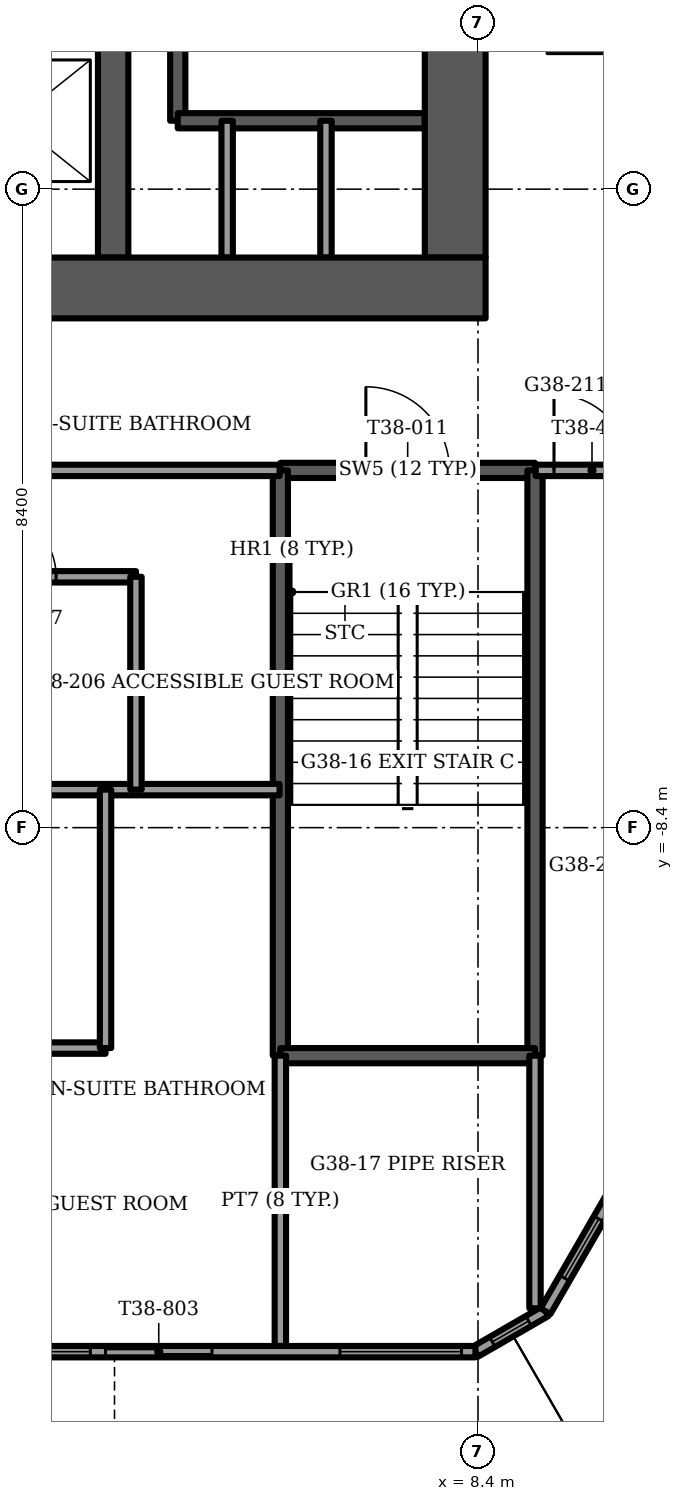
"""IFC4 building model, lengths in metres.
Left out: names, types, materials, properties, quantities, classifications, styles, units other than length and angle.
Written with IfcOpenShell. Run it as: python <this file> out.ifc"""

import sys

from ifc_helpers import new_model, si_unit, direction, frame, frame_2d, origin, place, context, subcontext, project, spatial, rectangle, extrude, element, fill, save


model = new_model("IFC4")
c1 = context("Model", 3, precision=1e-05, world=origin(), true_north=direction((0.0, 1.0)))
c2 = subcontext(c1, "Body", "Model", "MODEL_VIEW")
j1 = project(units=[si_unit("LENGTHUNIT", "METRE"), si_unit("PLANEANGLEUNIT", "RADIAN")], contexts=[c1])
p1 = place(None, origin())
s1 = spatial("IfcSite", under=j1, at=p1, CompositionType="ELEMENT")
p2 = place(p1, origin())
s2 = spatial("IfcBuilding", under=s1, at=p2, CompositionType="ELEMENT")
p3 = place(p2, frame((0.0, 0.0, 157.0)))
s3 = spatial("IfcBuildingStorey", under=s2, at=p3, CompositionType="ELEMENT", Elevation=157.0)
p4 = place(p3, frame((-8.5, -1.3, -0.3), z_axis=(0.0, 0.0, 1.0), x_axis=(1.0, 0.0, 0.0)))
e1 = element("IfcWall", 1, at=p4, inside=s3, PredefinedType="SHEAR", context=c2, shape_type="SweptSolid", body=[
    extrude(rectangle(XDim=17.0, YDim=0.8, at=frame_2d((8.5, 0.0))), origin(), (0.0, 0.0, 1.0), 3.75),
])
p5 = place(p4, frame((7.7, 0.0, 0.0)))
e2 = element("IfcOpeningElement", 2, at=p5, cuts=e1, PredefinedType="OPENING", context=c2, shape_type="SweptSolid", body=[
    extrude(rectangle(XDim=1.6, YDim=2.1, at=frame_2d((0.8, 1.05))), frame((0.0, 0.4, 0.0), z_axis=(0.0, -1.0, 0.0), x_axis=(1.0, 0.0, 0.0)), (0.0, 0.0, 1.0), 0.8),
])
p6 = place(p3, frame((8.1, -0.9, -0.3), z_axis=(0.0, 0.0, 1.0), x_axis=(0.0, 1.0, 0.0)))
e3 = element("IfcWall", 3, at=p6, inside=s3, PredefinedType="SHEAR", context=c2, shape_type="SweptSolid", body=[
    extrude(rectangle(XDim=9.8, YDim=0.8, at=frame_2d((4.9, 0.0))), origin(), (0.0, 0.0, 1.0), 3.75),
])
p7 = place(p6, frame((8.15, 0.0, 0.0)))
e4 = element("IfcOpeningElement", 4, at=p7, cuts=e3, PredefinedType="OPENING", context=c2, shape_type="SweptSolid", body=[
    extrude(rectangle(XDim=1.1, YDim=2.1, at=frame_2d((0.55, 1.05))), frame((0.0, 0.4, 0.0), z_axis=(0.0, -1.0, 0.0), x_axis=(1.0, 0.0, 0.0)), (0.0, 0.0, 1.0), 0.8),
])
p8 = place(p3, frame((3.6, -0.9, -0.3), z_axis=(0.0, 0.0, 1.0), x_axis=(0.0, 1.0, 0.0)))
e5 = element("IfcWall", 5, at=p8, inside=s3, PredefinedType="SHEAR", context=c2, shape_type="SweptSolid", body=[
    extrude(rectangle(XDim=9.8, YDim=0.4, at=frame_2d((4.9, 0.0))), origin(), (0.0, 0.0, 1.0), 3.75),
])
p9 = place(p3, frame((-8.366, -15.294, 0.0), z_axis=(0.0, 0.0, 1.0), x_axis=(1.0, 0.0, 0.0)))
e6 = element("IfcWall", 6, at=p9, inside=s3, PredefinedType="SOLIDWALL", context=c2, shape_type="SweptSolid", body=[
    extrude(rectangle(XDim=16.732, YDim=0.15, at=frame_2d((8.366, 0.0))), origin(), (0.0, 0.0, 1.0), 3.45),
])
p10 = place(p9, frame((2.916, 0.0, 0.15)))
e7 = element("IfcOpeningElement", 7, at=p10, cuts=e6, PredefinedType="OPENING", context=c2, shape_type="SweptSolid", body=[
    extrude(rectangle(XDim=1.6, YDim=2.85, at=frame_2d((0.8, 1.425))), frame((0.0, 0.075, 0.0), z_axis=(0.0, -1.0, 0.0), x_axis=(1.0, 0.0, 0.0)), (0.0, 0.0, 1.0), 0.15),
])
p11 = place(p9, frame((4.566, 0.0, 0.0)))
e8 = element("IfcOpeningElement", 8, at=p11, cuts=e6, PredefinedType="OPENING", context=c2, shape_type="SweptSolid", body=[
    extrude(rectangle(XDim=1.4, YDim=2.4, at=frame_2d((0.7, 1.2))), frame((0.0, 0.075, 0.0), z_axis=(0.0, -1.0, 0.0), x_axis=(1.0, 0.0, 0.0)), (0.0, 0.0, 1.0), 0.15),
])
p12 = place(p9, frame((7.816, 0.0, 0.15)))
e9 = element("IfcOpeningElement", 9, at=p12, cuts=e6, PredefinedType="OPENING", context=c2, shape_type="SweptSolid", body=[
    extrude(rectangle(XDim=0.9, YDim=2.85, at=frame_2d((0.45, 1.425))), frame((0.0, 0.075, 0.0), z_axis=(0.0, -1.0, 0.0), x_axis=(1.0, 0.0, 0.0)), (0.0, 0.0, 1.0), 0.15),
])
p13 = place(p9, frame((10.766, 0.0, 0.15)))
e10 = element("IfcOpeningElement", 10, at=p13, cuts=e6, PredefinedType="OPENING", context=c2, shape_type="SweptSolid", body=[
    extrude(rectangle(XDim=0.9, YDim=2.85, at=frame_2d((0.45, 1.425))), frame((0.0, 0.075, 0.0), z_axis=(0.0, -1.0, 0.0), x_axis=(1.0, 0.0, 0.0)), (0.0, 0.0, 1.0), 0.15),
])
p14 = place(p9, frame((11.866, 0.0, 0.0)))
e11 = element("IfcOpeningElement", 11, at=p14, cuts=e6, PredefinedType="OPENING", context=c2, shape_type="SweptSolid", body=[
    extrude(rectangle(XDim=1.4, YDim=2.4, at=frame_2d((0.7, 1.2))), frame((0.0, 0.075, 0.0), z_axis=(0.0, -1.0, 0.0), x_axis=(1.0, 0.0, 0.0)), (0.0, 0.0, 1.0), 0.15),
])
p15 = place(p9, frame((0.183, 0.0, 0.15)))
e12 = element("IfcOpeningElement", 12, at=p15, cuts=e6, PredefinedType="OPENING", context=c2, shape_type="SweptSolid", body=[
    extrude(rectangle(XDim=1.6, YDim=2.73, at=frame_2d((0.8, 1.365))), frame((0.0, 0.075, 0.0), z_axis=(0.0, -1.0, 0.0), x_axis=(1.0, 0.0, 0.0)), (0.0, 0.0, 1.0), 0.15),
])
p16 = place(p9, frame((14.949, 0.0, 0.15)))
e13 = element("IfcOpeningElement", 13, at=p16, cuts=e6, PredefinedType="OPENING", context=c2, shape_type="SweptSolid", body=[
    extrude(rectangle(XDim=1.6, YDim=2.73, at=frame_2d((0.8, 1.365))), frame((0.0, 0.075, 0.0), z_axis=(0.0, -1.0, 0.0), x_axis=(1.0, 0.0, 0.0)), (0.0, 0.0, 1.0), 0.15),
])
p17 = place(p3, frame((9.289, -14.762, 0.0), z_axis=(0.0, 0.0, 1.0), x_axis=(0.499985985267, 0.866033495043, 0.0)))
e14 = element("IfcWall", 14, at=p17, inside=s3, PredefinedType="SOLIDWALL", context=c2, shape_type="SweptSolid", body=[
    extrude(rectangle(XDim=16.279, YDim=0.15, at=frame_2d((8.14, 0.0))), origin(), (0.0, 0.0, 1.0), 3.45),
])
p18 = place(p17, frame((2.14, 0.0, 0.15)))
e15 = element("IfcOpeningElement", 15, at=p18, cuts=e14, PredefinedType="OPENING", context=c2, shape_type="SweptSolid", body=[
    extrude(rectangle(XDim=1.6, YDim=2.85, at=frame_2d((0.8, 1.425))), frame((0.0, 0.075, 0.0), z_axis=(0.0, -1.0, 0.0), x_axis=(1.0, 0.0, 0.0)), (0.0, 0.0, 1.0), 0.15),
])
p19 = place(p17, frame((4.34, 0.0, 0.0)))
e16 = element("IfcOpeningElement", 16, at=p19, cuts=e14, PredefinedType="OPENING", context=c2, shape_type="SweptSolid", body=[
    extrude(rectangle(XDim=1.4, YDim=2.4, at=frame_2d((0.7, 1.2))), frame((0.0, 0.075, 0.0), z_axis=(0.0, -1.0, 0.0), x_axis=(1.0, 0.0, 0.0)), (0.0, 0.0, 1.0), 0.15),
])
p20 = place(p17, frame((6.34, 0.0, 0.15)))
e17 = element("IfcOpeningElement", 17, at=p20, cuts=e14, PredefinedType="OPENING", context=c2, shape_type="SweptSolid", body=[
    extrude(rectangle(XDim=0.9, YDim=2.85, at=frame_2d((0.45, 1.425))), frame((0.0, 0.075, 0.0), z_axis=(0.0, -1.0, 0.0), x_axis=(1.0, 0.0, 0.0)), (0.0, 0.0, 1.0), 0.15),
])
p21 = place(p17, frame((7.497, 0.0, 0.0)))
e18 = element("IfcOpeningElement", 18, at=p21, cuts=e14, PredefinedType="OPENING", context=c2, shape_type="SweptSolid", body=[
    extrude(rectangle(XDim=1.4, YDim=2.4, at=frame_2d((0.7, 1.2))), frame((0.0, 0.075, 0.0), z_axis=(0.0, -1.0, 0.0), x_axis=(1.0, 0.0, 0.0)), (0.0, 0.0, 1.0), 0.15),
])
p22 = place(p17, frame((10.54, 0.0, 0.15)))
e19 = element("IfcOpeningElement", 19, at=p22, cuts=e14, PredefinedType="OPENING", context=c2, shape_type="SweptSolid", body=[
    extrude(rectangle(XDim=1.6, YDim=2.85, at=frame_2d((0.8, 1.425))), frame((0.0, 0.075, 0.0), z_axis=(0.0, -1.0, 0.0), x_axis=(1.0, 0.0, 0.0)), (0.0, 0.0, 1.0), 0.15),
])
p23 = place(p17, frame((0.502, 0.0, 0.15)))
e20 = element("IfcOpeningElement", 20, at=p23, cuts=e14, PredefinedType="OPENING", context=c2, shape_type="SweptSolid", body=[
    extrude(rectangle(XDim=0.9, YDim=2.73, at=frame_2d((0.45, 1.365))), frame((0.0, 0.075, 0.0), z_axis=(0.0, -1.0, 0.0), x_axis=(1.0, 0.0, 0.0)), (0.0, 0.0, 1.0), 0.15),
])
p24 = place(p3, frame((17.428, 0.402, 0.0), z_axis=(0.0, 0.0, 1.0), x_axis=(-0.500000203029, 0.866025286565, 0.0)))
e21 = element("IfcWall", 21, at=p24, inside=s3, PredefinedType="SOLIDWALL", context=c2, shape_type="SweptSolid", body=[
    extrude(rectangle(XDim=19.504, YDim=0.15, at=frame_2d((9.752, 0.0))), origin(), (0.0, 0.0, 1.0), 3.45),
])
p25 = place(p24, frame((4.947, 0.0, 0.0)))
e22 = element("IfcOpeningElement", 22, at=p25, cuts=e21, PredefinedType="OPENING", context=c2, shape_type="SweptSolid", body=[
    extrude(rectangle(XDim=1.4, YDim=2.4, at=frame_2d((0.7, 1.2))), frame((0.0, 0.075, 0.0), z_axis=(0.0, -1.0, 0.0), x_axis=(1.0, 0.0, 0.0)), (0.0, 0.0, 1.0), 0.15),
])
p26 = place(p24, frame((8.666, 0.0, 0.15)))
e23 = element("IfcOpeningElement", 23, at=p26, cuts=e21, PredefinedType="OPENING", context=c2, shape_type="SweptSolid", body=[
    extrude(rectangle(XDim=1.6, YDim=2.85, at=frame_2d((0.8, 1.425))), frame((0.0, 0.075, 0.0), z_axis=(0.0, -1.0, 0.0), x_axis=(1.0, 0.0, 0.0)), (0.0, 0.0, 1.0), 0.15),
])
p27 = place(p24, frame((10.866, 0.0, 0.15)))
e24 = element("IfcOpeningElement", 24, at=p27, cuts=e21, PredefinedType="OPENING", context=c2, shape_type="SweptSolid", body=[
    extrude(rectangle(XDim=1.4, YDim=2.85, at=frame_2d((0.7, 1.425))), frame((0.0, 0.075, 0.0), z_axis=(0.0, -1.0, 0.0), x_axis=(1.0, 0.0, 0.0)), (0.0, 0.0, 1.0), 0.15),
])
p28 = place(p24, frame((14.684, 0.0, 0.15)))
e25 = element("IfcOpeningElement", 25, at=p28, cuts=e21, PredefinedType="OPENING", context=c2, shape_type="SweptSolid", body=[
    extrude(rectangle(XDim=1.6, YDim=2.85, at=frame_2d((0.8, 1.425))), frame((0.0, 0.075, 0.0), z_axis=(0.0, -1.0, 0.0), x_axis=(1.0, 0.0, 0.0)), (0.0, 0.0, 1.0), 0.15),
])
p29 = place(p24, frame((1.233, 0.0, 0.15)))
e26 = element("IfcOpeningElement", 26, at=p29, cuts=e21, PredefinedType="OPENING", context=c2, shape_type="SweptSolid", body=[
    extrude(rectangle(XDim=1.6, YDim=2.73, at=frame_2d((0.8, 1.365))), frame((0.0, 0.075, 0.0), z_axis=(0.0, -1.0, 0.0), x_axis=(1.0, 0.0, 0.0)), (0.0, 0.0, 1.0), 0.15),
])
p30 = place(p24, frame((18.369, 0.0, 0.15)))
e27 = element("IfcOpeningElement", 27, at=p30, cuts=e21, PredefinedType="OPENING", context=c2, shape_type="SweptSolid", body=[
    extrude(rectangle(XDim=0.9, YDim=2.73, at=frame_2d((0.45, 1.365))), frame((0.0, 0.075, 0.0), z_axis=(0.0, -1.0, 0.0), x_axis=(1.0, 0.0, 0.0)), (0.0, 0.0, 1.0), 0.15),
])
p31 = place(p3, frame((8.366, -15.294, 0.0), z_axis=(0.0, 0.0, 1.0), x_axis=(0.866105447774, 0.499861334108, 0.0)))
e28 = element("IfcWall", 28, at=p31, inside=s3, PredefinedType="SOLIDWALL", context=c2, shape_type="SweptSolid", body=[
    extrude(rectangle(XDim=1.065, YDim=0.15, at=frame_2d((0.533, 0.0))), origin(), (0.0, 0.0, 1.0), 3.45),
])
p32 = place(p31, frame((0.258, 0.0, 0.15)))
e29 = element("IfcOpeningElement", 29, at=p32, cuts=e28, PredefinedType="OPENING", context=c2, shape_type="SweptSolid", body=[
    extrude(rectangle(XDim=0.55, YDim=2.85, at=frame_2d((0.275, 1.425))), frame((0.0, 0.075, 0.0), z_axis=(0.0, -1.0, 0.0), x_axis=(1.0, 0.0, 0.0)), (0.0, 0.0, 1.0), 0.15),
])
p33 = place(p3, frame((4.45, 0.9, -0.3), z_axis=(0.0, 0.0, 1.0), x_axis=(0.0, 1.0, 0.0)))
e30 = element("IfcWall", 30, at=p33, inside=s3, PredefinedType="SOLIDWALL", context=c2, shape_type="SweptSolid", body=[
    extrude(rectangle(XDim=8.0, YDim=0.2, at=frame_2d((4.0, 0.0))), origin(), (0.0, 0.0, 1.0), 3.75),
])
p34 = place(p3, frame((4.45, 0.9, -0.3), z_axis=(0.0, 0.0, 1.0), x_axis=(1.0, 0.0, 0.0)))
e31 = element("IfcWall", 31, at=p34, inside=s3, PredefinedType="SOLIDWALL", context=c2, shape_type="SweptSolid", body=[
    extrude(rectangle(XDim=3.25, YDim=0.2, at=frame_2d((1.625, 0.0))), origin(), (0.0, 0.0, 1.0), 3.75),
])
for number, where, z_axis, x_axis in (
    (32, (5.1, -0.9, 0.0), (0.0, 0.0, 1.0), (0.0, 1.0, 0.0)),
    (33, (6.4, -0.9, 0.0), (0.0, 0.0, 1.0), (0.0, 1.0, 0.0)),
):
    element("IfcWall", number, at=place(p3, frame(where, z_axis=z_axis, x_axis=x_axis)), inside=s3, PredefinedType="PARTITIONING", context=c2, shape_type="SweptSolid", body=[
        extrude(rectangle(XDim=1.8, YDim=0.15, at=frame_2d((0.9, 0.0))), origin(), (0.0, 0.0, 1.0), 3.45),
    ])
p35 = place(p3, frame((5.8, -3.7, -0.3), z_axis=(0.0, 0.0, 1.0), x_axis=(1.0, 0.0, 0.0)))
e34 = element("IfcWall", 34, at=p35, inside=s3, PredefinedType="SOLIDWALL", context=c2, shape_type="SweptSolid", body=[
    extrude(rectangle(XDim=3.35, YDim=0.2, at=frame_2d((1.675, 0.0))), origin(), (0.0, 0.0, 1.0), 3.75),
])
p36 = place(p35, frame((1.125, 0.0, 0.0)))
e35 = element("IfcOpeningElement", 35, at=p36, cuts=e34, PredefinedType="OPENING", context=c2, shape_type="SweptSolid", body=[
    extrude(rectangle(XDim=1.1, YDim=2.1, at=frame_2d((0.55, 1.05))), frame((0.0, 0.1, 0.0), z_axis=(0.0, -1.0, 0.0), x_axis=(1.0, 0.0, 0.0)), (0.0, 0.0, 1.0), 0.2),
])
for number, where, z_axis, x_axis in (
    (36, (5.8, -3.7, -0.3), (0.0, 0.0, 1.0), (0.0, -1.0, 0.0)),
    (37, (9.15, -3.7, -0.3), (0.0, 0.0, 1.0), (0.0, -1.0, 0.0)),
):
    element("IfcWall", number, at=place(p3, frame(where, z_axis=z_axis, x_axis=x_axis)), inside=s3, PredefinedType="SOLIDWALL", context=c2, shape_type="SweptSolid", body=[
        extrude(rectangle(XDim=7.7, YDim=0.2, at=frame_2d((3.85, 0.0))), origin(), (0.0, 0.0, 1.0), 3.75),
    ])
p37 = place(p3, frame((5.8, -11.4, -0.3), z_axis=(0.0, 0.0, 1.0), x_axis=(1.0, 0.0, 0.0)))
e38 = element("IfcWall", 38, at=p37, inside=s3, PredefinedType="SOLIDWALL", context=c2, shape_type="SweptSolid", body=[
    extrude(rectangle(XDim=3.35, YDim=0.2, at=frame_2d((1.675, 0.0))), origin(), (0.0, 0.0, 1.0), 3.75),
])
p38 = place(p3, frame((5.8, -11.4, 0.0), z_axis=(0.0, 0.0, 1.0), x_axis=(0.0, -1.0, 0.0)))
e39 = element("IfcWall", 39, at=p38, inside=s3, PredefinedType="PARTITIONING", context=c2, shape_type="SweptSolid", body=[
    extrude(rectangle(XDim=3.819, YDim=0.15, at=frame_2d((1.91, 0.0))), origin(), (0.0, 0.0, 1.0), 3.45),
])
p39 = place(p3, frame((9.15, -11.4, 0.0), z_axis=(0.0, 0.0, 1.0), x_axis=(0.0, -1.0, 0.0)))
e40 = element("IfcWall", 40, at=p39, inside=s3, PredefinedType="PARTITIONING", context=c2, shape_type="SweptSolid", body=[
    extrude(rectangle(XDim=3.323, YDim=0.15, at=frame_2d((1.662, 0.0))), origin(), (0.0, 0.0, 1.0), 3.45),
])
p40 = place(p3, frame((0.9, -11.3, 0.0), z_axis=(0.0, 0.0, 1.0), x_axis=(1.0, 0.0, 0.0)))
e41 = element("IfcWall", 41, at=p40, inside=s3, PredefinedType="PARTITIONING", context=c2, shape_type="SweptSolid", body=[
    extrude(rectangle(XDim=2.6, YDim=0.15, at=frame_2d((1.3, 0.0))), origin(), (0.0, 0.0, 1.0), 3.45),
])
p41 = place(p40, frame((0.9, 0.0, 0.0)))
e42 = element("IfcOpeningElement", 42, at=p41, cuts=e41, PredefinedType="OPENING", context=c2, shape_type="SweptSolid", body=[
    extrude(rectangle(XDim=0.8, YDim=2.1, at=frame_2d((0.4, 1.05))), frame((0.0, 0.075, 0.0), z_axis=(0.0, -1.0, 0.0), x_axis=(1.0, 0.0, 0.0)), (0.0, 0.0, 1.0), 0.15),
])
p42 = place(p3, frame((0.9, -7.9, 0.0), z_axis=(0.0, 0.0, 1.0), x_axis=(1.0, 0.0, 0.0)))
e43 = element("IfcWall", 43, at=p42, inside=s3, PredefinedType="PARTITIONING", context=c2, shape_type="SweptSolid", body=[
    extrude(rectangle(XDim=4.89, YDim=0.15, at=frame_2d((2.445, 0.0))), origin(), (0.0, 0.0, 1.0), 3.45),
])
p43 = place(p3, frame((0.9, -5.1, 0.0), z_axis=(0.0, 0.0, 1.0), x_axis=(1.0, 0.0, 0.0)))
e44 = element("IfcWall", 44, at=p43, inside=s3, PredefinedType="PARTITIONING", context=c2, shape_type="SweptSolid", body=[
    extrude(rectangle(XDim=3.0, YDim=0.15, at=frame_2d((1.5, 0.0))), origin(), (0.0, 0.0, 1.0), 3.45),
])
p44 = place(p43, frame((1.05, 0.0, 0.0)))
e45 = element("IfcOpeningElement", 45, at=p44, cuts=e44, PredefinedType="OPENING", context=c2, shape_type="SweptSolid", body=[
    extrude(rectangle(XDim=0.9, YDim=2.1, at=frame_2d((0.45, 1.05))), frame((0.0, 0.075, 0.0), z_axis=(0.0, -1.0, 0.0), x_axis=(1.0, 0.0, 0.0)), (0.0, 0.0, 1.0), 0.15),
])
p45 = place(p3, frame((0.86, -3.7, 0.0), z_axis=(0.0, 0.0, 1.0), x_axis=(1.0, 0.0, 0.0)))
e46 = element("IfcWall", 46, at=p45, inside=s3, PredefinedType="PARTITIONING", context=c2, shape_type="SweptSolid", body=[
    extrude(rectangle(XDim=4.93, YDim=0.15, at=frame_2d((2.465, 0.0))), origin(), (0.0, 0.0, 1.0), 3.45),
])
p46 = place(p3, frame((9.16, -3.7, 0.0), z_axis=(0.0, 0.0, 1.0), x_axis=(1.0, 0.0, 0.0)))
e47 = element("IfcWall", 47, at=p46, inside=s3, PredefinedType="PARTITIONING", context=c2, shape_type="SweptSolid", body=[
    extrude(rectangle(XDim=6.567, YDim=0.15, at=frame_2d((3.284, 0.0))), origin(), (0.0, 0.0, 1.0), 3.45),
])
p47 = place(p46, frame((0.24, 0.0, 0.0)))
e48 = element("IfcOpeningElement", 48, at=p47, cuts=e47, PredefinedType="OPENING", context=c2, shape_type="SweptSolid", body=[
    extrude(rectangle(XDim=1.0, YDim=2.1, at=frame_2d((0.5, 1.05))), frame((0.0, 0.075, 0.0), z_axis=(0.0, -1.0, 0.0), x_axis=(1.0, 0.0, 0.0)), (0.0, 0.0, 1.0), 0.15),
])
p48 = place(p3, frame((3.9, -7.9, 0.0), z_axis=(0.0, 0.0, 1.0), x_axis=(0.0, 1.0, 0.0)))
e49 = element("IfcWall", 49, at=p48, inside=s3, PredefinedType="PARTITIONING", context=c2, shape_type="SweptSolid", body=[
    extrude(rectangle(XDim=2.8, YDim=0.15, at=frame_2d((1.4, 0.0))), origin(), (0.0, 0.0, 1.0), 3.45),
])
p49 = place(p3, frame((3.5, -11.3, 0.0), z_axis=(0.0, 0.0, 1.0), x_axis=(0.0, 1.0, 0.0)))
e50 = element("IfcWall", 50, at=p49, inside=s3, PredefinedType="PARTITIONING", context=c2, shape_type="SweptSolid", body=[
    extrude(rectangle(XDim=3.4, YDim=0.15, at=frame_2d((1.7, 0.0))), origin(), (0.0, 0.0, 1.0), 3.45),
])
p50 = place(p13, origin())
e51 = element("IfcWindow", 51, at=p50, inside=s3, PartitioningType="SINGLE_PANEL", PredefinedType="WINDOW", context=c2, shape_type="SweptSolid", body=[
    extrude(rectangle(XDim=0.9, YDim=2.85, at=frame_2d((0.45, 1.425))), frame((0.0, 0.03, 0.0), z_axis=(0.0, -1.0, 0.0), x_axis=(1.0, 0.0, 0.0)), (0.0, 0.0, 1.0), 0.06),
])
fill(e10, e51)
p51 = place(p14, origin())
e52 = element("IfcDoor", 52, at=p51, inside=s3, OperationType="SLIDING_TO_LEFT", PredefinedType="DOOR", context=c2, shape_type="SweptSolid", body=[
    extrude(rectangle(XDim=1.4, YDim=2.4, at=frame_2d((0.7, 1.2))), frame((0.0, 0.025, 0.0), z_axis=(0.0, -1.0, 0.0), x_axis=(1.0, 0.0, 0.0)), (0.0, 0.0, 1.0), 0.05),
])
fill(e11, e52)
p52 = place(p16, origin())
e53 = element("IfcWindow", 53, at=p52, inside=s3, PartitioningType="SINGLE_PANEL", PredefinedType="WINDOW", context=c2, shape_type="SweptSolid", body=[
    extrude(rectangle(XDim=1.6, YDim=2.73, at=frame_2d((0.8, 1.365))), frame((0.0, 0.03, 0.0), z_axis=(0.0, -1.0, 0.0), x_axis=(1.0, 0.0, 0.0)), (0.0, 0.0, 1.0), 0.06),
])
fill(e13, e53)
p53 = place(p23, origin())
e54 = element("IfcWindow", 54, at=p53, inside=s3, PartitioningType="SINGLE_PANEL", PredefinedType="WINDOW", context=c2, shape_type="SweptSolid", body=[
    extrude(rectangle(XDim=0.9, YDim=2.73, at=frame_2d((0.45, 1.365))), frame((0.0, 0.03, 0.0), z_axis=(0.0, -1.0, 0.0), x_axis=(1.0, 0.0, 0.0)), (0.0, 0.0, 1.0), 0.06),
])
fill(e20, e54)
p54 = place(p32, origin())
e55 = element("IfcWindow", 55, at=p54, inside=s3, PartitioningType="SINGLE_PANEL", PredefinedType="WINDOW", context=c2, shape_type="SweptSolid", body=[
    extrude(rectangle(XDim=0.55, YDim=2.85, at=frame_2d((0.275, 1.425))), frame((0.0, 0.03, 0.0), z_axis=(0.0, -1.0, 0.0), x_axis=(1.0, 0.0, 0.0)), (0.0, 0.0, 1.0), 0.06),
])
fill(e29, e55)
p55 = place(p36, origin())
e56 = element("IfcDoor", 56, at=p55, inside=s3, OperationType="SINGLE_SWING_LEFT", PredefinedType="DOOR", context=c2, shape_type="SweptSolid", body=[
    extrude(rectangle(XDim=1.1, YDim=2.1, at=frame_2d((0.55, 1.05))), frame((0.0, 0.025, 0.0), z_axis=(0.0, -1.0, 0.0), x_axis=(1.0, 0.0, 0.0)), (0.0, 0.0, 1.0), 0.05),
])
fill(e35, e56)
p56 = place(p44, origin())
e57 = element("IfcDoor", 57, at=p56, inside=s3, OperationType="SINGLE_SWING_LEFT", PredefinedType="DOOR", context=c2, shape_type="SweptSolid", body=[
    extrude(rectangle(XDim=0.9, YDim=2.1, at=frame_2d((0.45, 1.05))), frame((0.0, 0.025, 0.0), z_axis=(0.0, -1.0, 0.0), x_axis=(1.0, 0.0, 0.0)), (0.0, 0.0, 1.0), 0.05),
])
fill(e45, e57)
p57 = place(p47, origin())
e58 = element("IfcDoor", 58, at=p57, inside=s3, OperationType="SINGLE_SWING_LEFT", PredefinedType="DOOR", context=c2, shape_type="SweptSolid", body=[
    extrude(rectangle(XDim=1.0, YDim=2.1, at=frame_2d((0.5, 1.05))), frame((0.0, 0.025, 0.0), z_axis=(0.0, -1.0, 0.0), x_axis=(1.0, 0.0, 0.0)), (0.0, 0.0, 1.0), 0.05),
])
fill(e48, e58)
save(model, sys.argv[1])
